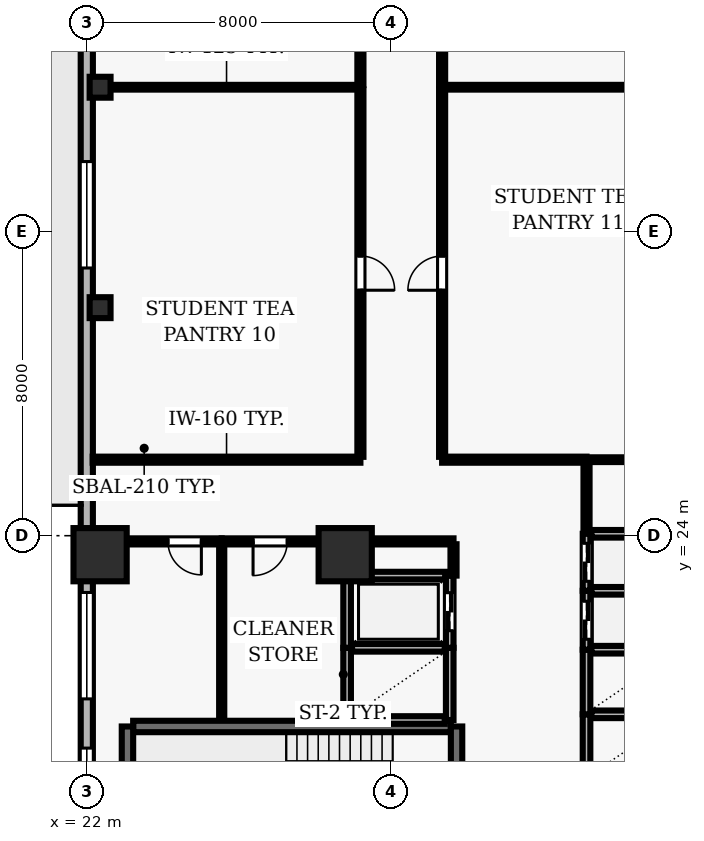
"""IFC4 building model, lengths in metres.
Left out: names, types, materials, properties, quantities, classifications, styles, units other than length and angle.
Written with IfcOpenShell. Run it as: python <this file> out.ifc"""

import sys

from ifc_helpers import new_model, si_unit, direction, frame, frame_2d, origin, origin_2d, place, context, subcontext, project, spatial, rectangle, hollow_rectangle, extrude, element, fill, save


model = new_model("IFC4")
c1 = context("Model", 3, precision=1e-05, world=origin(), true_north=direction((0.0, 1.0)))
c2 = subcontext(c1, "Body", "Model", "MODEL_VIEW")
j1 = project(units=[si_unit("LENGTHUNIT", "METRE"), si_unit("PLANEANGLEUNIT", "RADIAN")], contexts=[c1])
p1 = place(None, origin())
s1 = spatial("IfcSite", under=j1, at=p1, CompositionType="ELEMENT")
p2 = place(p1, origin())
s2 = spatial("IfcBuilding", under=s1, at=p2, CompositionType="ELEMENT")
p3 = place(p2, frame((0.0, 0.0, 85.6)))
s3 = spatial("IfcBuildingStorey", under=s2, at=p3, CompositionType="ELEMENT", Elevation=85.6)
for number, where, z_axis, x_axis in (
    (1, (22.35, 23.5, 0.0), (0.0, 0.0, 1.0), (1.0, 0.0, 0.0)),
    (2, (28.8, 23.5, 0.0), (0.0, 0.0, 1.0), (1.0, 0.0, 0.0)),
):
    element("IfcColumn", number, at=place(p3, frame(where, z_axis=z_axis, x_axis=x_axis)), inside=s3, PredefinedType="COLUMN", context=c2, shape_type="SweptSolid", body=[
        extrude(rectangle(XDim=1.4, YDim=1.4, at=origin_2d()), origin(), (0.0, 0.0, 1.0), 3.9),
    ])
for number, where, z_axis, x_axis in (
    (3, (22.35, 30.0, 0.0), (0.0, 0.0, 1.0), (1.0, 0.0, 0.0)),
    (4, (22.35, 35.8, 0.0), (0.0, 0.0, 1.0), (1.0, 0.0, 0.0)),
):
    element("IfcColumn", number, at=place(p3, frame(where, z_axis=z_axis, x_axis=x_axis)), inside=s3, PredefinedType="COLUMN", context=c2, shape_type="SweptSolid", body=[
        extrude(hollow_rectangle(XDim=0.55, YDim=0.55, WallThickness=0.025, at=origin_2d()), origin(), (0.0, 0.0, 1.0), 3.9),
    ])
p4 = place(p3, frame((22.0, 51.5, 0.0), z_axis=(0.0, 0.0, 1.0), x_axis=(0.0, -1.0, 0.0)))
e5 = element("IfcWall", 5, at=p4, inside=s3, PredefinedType="SOLIDWALL", context=c2, shape_type="SweptSolid", body=[
    extrude(rectangle(XDim=49.0, YDim=0.32, at=frame_2d((24.5, 0.0))), origin(), (0.0, 0.0, 1.0), 3.69),
])
p5 = place(p4, frame((12.1, 0.0, 0.0)))
e6 = element("IfcOpeningElement", 6, at=p5, cuts=e5, PredefinedType="OPENING", context=c2, shape_type="SweptSolid", body=[
    extrude(rectangle(XDim=1.0, YDim=2.2, at=frame_2d((0.5, 1.1))), frame((0.0, 0.17, 0.0), z_axis=(0.0, -1.0, 0.0), x_axis=(1.0, 0.0, 0.0)), (0.0, 0.0, 1.0), 0.34),
])
p6 = place(p4, frame((1.322, 0.0, 0.9)))
e7 = element("IfcOpeningElement", 7, at=p6, cuts=e5, PredefinedType="OPENING", context=c2, shape_type="SweptSolid", body=[
    extrude(rectangle(XDim=2.8, YDim=1.8, at=frame_2d((1.4, 0.9))), frame((0.0, 0.17, 0.0), z_axis=(0.0, -1.0, 0.0), x_axis=(1.0, 0.0, 0.0)), (0.0, 0.0, 1.0), 0.34),
])
p7 = place(p4, frame((17.656, 0.0, 0.9)))
e8 = element("IfcOpeningElement", 8, at=p7, cuts=e5, PredefinedType="OPENING", context=c2, shape_type="SweptSolid", body=[
    extrude(rectangle(XDim=2.8, YDim=1.8, at=frame_2d((1.4, 0.9))), frame((0.0, 0.17, 0.0), z_axis=(0.0, -1.0, 0.0), x_axis=(1.0, 0.0, 0.0)), (0.0, 0.0, 1.0), 0.34),
])
p8 = place(p4, frame((28.994, 0.0, 0.9)))
e9 = element("IfcOpeningElement", 9, at=p8, cuts=e5, PredefinedType="OPENING", context=c2, shape_type="SweptSolid", body=[
    extrude(rectangle(XDim=2.8, YDim=1.8, at=frame_2d((1.4, 0.9))), frame((0.0, 0.17, 0.0), z_axis=(0.0, -1.0, 0.0), x_axis=(1.0, 0.0, 0.0)), (0.0, 0.0, 1.0), 0.34),
])
p9 = place(p4, frame((33.089, 0.0, 0.9)))
e10 = element("IfcOpeningElement", 10, at=p9, cuts=e5, PredefinedType="OPENING", context=c2, shape_type="SweptSolid", body=[
    extrude(rectangle(XDim=2.8, YDim=1.8, at=frame_2d((1.4, 0.9))), frame((0.0, 0.17, 0.0), z_axis=(0.0, -1.0, 0.0), x_axis=(1.0, 0.0, 0.0)), (0.0, 0.0, 1.0), 0.34),
])
p10 = place(p4, frame((39.433, 0.0, 0.9)))
e11 = element("IfcOpeningElement", 11, at=p10, cuts=e5, PredefinedType="OPENING", context=c2, shape_type="SweptSolid", body=[
    extrude(rectangle(XDim=2.8, YDim=1.8, at=frame_2d((1.4, 0.9))), frame((0.0, 0.17, 0.0), z_axis=(0.0, -1.0, 0.0), x_axis=(1.0, 0.0, 0.0)), (0.0, 0.0, 1.0), 0.34),
])
p11 = place(p3, frame((31.58, 18.98, 0.0), z_axis=(0.0, 0.0, 1.0), x_axis=(-1.0, 0.0, 0.0)))
e12 = element("IfcWall", 12, at=p11, inside=s3, PredefinedType="SHEAR", context=c2, shape_type="SweptSolid", body=[
    extrude(rectangle(XDim=8.36, YDim=0.3, at=frame_2d((4.18, 0.0))), origin(), (0.0, 0.0, 1.0), 3.69),
])
p12 = place(p3, frame((23.07, 18.98, 0.0), z_axis=(0.0, 0.0, 1.0), x_axis=(0.0, -1.0, 0.0)))
e13 = element("IfcWall", 13, at=p12, inside=s3, PredefinedType="SHEAR", context=c2, shape_type="SweptSolid", body=[
    extrude(rectangle(XDim=3.51, YDim=0.3, at=frame_2d((1.755, 0.0))), origin(), (0.0, 0.0, 1.0), 3.69),
])
p13 = place(p3, frame((31.73, 15.47, 0.0), z_axis=(0.0, 0.0, 1.0), x_axis=(0.0, 1.0, 0.0)))
e14 = element("IfcWall", 14, at=p13, inside=s3, PredefinedType="SHEAR", context=c2, shape_type="SweptSolid", body=[
    extrude(rectangle(XDim=3.51, YDim=0.3, at=frame_2d((1.755, 0.0))), origin(), (0.0, 0.0, 1.0), 3.69),
])
p14 = place(p13, frame((1.18, 0.0, 0.0)))
e15 = element("IfcOpeningElement", 15, at=p14, cuts=e14, PredefinedType="OPENING", context=c2, shape_type="SweptSolid", body=[
    extrude(rectangle(XDim=1.15, YDim=2.15, at=frame_2d((0.575, 1.075))), frame((0.0, 0.16, 0.0), z_axis=(0.0, -1.0, 0.0), x_axis=(1.0, 0.0, 0.0)), (0.0, 0.0, 1.0), 0.32),
])
p15 = place(p3, frame((35.15, 19.3, 0.0), z_axis=(0.0, 0.0, 1.0), x_axis=(0.0, -1.0, 0.0)))
e16 = element("IfcWall", 16, at=p15, inside=s3, PredefinedType="SOLIDWALL", context=c2, shape_type="SweptSolid", body=[
    extrude(rectangle(XDim=1.7, YDim=0.2, at=frame_2d((0.85, 0.0))), origin(), (0.0, 0.0, 1.0), 3.69),
])
p16 = place(p3, frame((37.42, 19.3, 0.0), z_axis=(0.0, 0.0, 1.0), x_axis=(-1.0, 0.0, 0.0)))
e17 = element("IfcWall", 17, at=p16, inside=s3, PredefinedType="SOLIDWALL", context=c2, shape_type="SweptSolid", body=[
    extrude(rectangle(XDim=2.14, YDim=0.2, at=frame_2d((1.07, 0.0))), origin(), (0.0, 0.0, 1.0), 3.69),
])
p17 = place(p3, frame((35.15, 21.0, 0.0), z_axis=(0.0, 0.0, 1.0), x_axis=(0.0, -1.0, 0.0)))
e18 = element("IfcWall", 18, at=p17, inside=s3, PredefinedType="SOLIDWALL", context=c2, shape_type="SweptSolid", body=[
    extrude(rectangle(XDim=1.7, YDim=0.2, at=frame_2d((0.85, 0.0))), origin(), (0.0, 0.0, 1.0), 3.69),
])
p18 = place(p3, frame((37.42, 21.0, 0.0), z_axis=(0.0, 0.0, 1.0), x_axis=(-1.0, 0.0, 0.0)))
e19 = element("IfcWall", 19, at=p18, inside=s3, PredefinedType="SOLIDWALL", context=c2, shape_type="SweptSolid", body=[
    extrude(rectangle(XDim=2.14, YDim=0.2, at=frame_2d((1.07, 0.0))), origin(), (0.0, 0.0, 1.0), 3.69),
])
for number, where, z_axis, x_axis in (
    (20, (28.85, 21.05, 0.0), (0.0, 0.0, 1.0), (0.0, -1.0, 0.0)),
    (21, (31.55, 19.15, 0.0), (0.0, 0.0, 1.0), (0.0, 1.0, 0.0)),
):
    element("IfcWall", number, at=place(p3, frame(where, z_axis=z_axis, x_axis=x_axis)), inside=s3, PredefinedType="SOLIDWALL", context=c2, shape_type="SweptSolid", body=[
        extrude(rectangle(XDim=1.9, YDim=0.2, at=frame_2d((0.95, 0.0))), origin(), (0.0, 0.0, 1.0), 3.69),
    ])
for number, where, z_axis, x_axis in (
    (22, (28.98, 19.15, 0.0), (0.0, 0.0, 1.0), (1.0, 0.0, 0.0)),
    (23, (31.42, 21.05, 0.0), (0.0, 0.0, 1.0), (-1.0, 0.0, 0.0)),
):
    element("IfcWall", number, at=place(p3, frame(where, z_axis=z_axis, x_axis=x_axis)), inside=s3, PredefinedType="SOLIDWALL", context=c2, shape_type="SweptSolid", body=[
        extrude(rectangle(XDim=2.44, YDim=0.2, at=frame_2d((1.22, 0.0))), origin(), (0.0, 0.0, 1.0), 3.69),
    ])
p19 = place(p3, frame((35.15, 22.55, 0.0), z_axis=(0.0, 0.0, 1.0), x_axis=(0.0, -1.0, 0.0)))
e24 = element("IfcWall", 24, at=p19, inside=s3, PredefinedType="SOLIDWALL", context=c2, shape_type="SweptSolid", body=[
    extrude(rectangle(XDim=1.55, YDim=0.2, at=frame_2d((0.775, 0.0))), origin(), (0.0, 0.0, 1.0), 3.69),
])
p20 = place(p19, frame((0.275, 0.0, 0.0)))
e25 = element("IfcOpeningElement", 25, at=p20, cuts=e24, PredefinedType="OPENING", context=c2, shape_type="SweptSolid", body=[
    extrude(rectangle(XDim=1.0, YDim=2.1, at=frame_2d((0.5, 1.05))), frame((0.0, 0.11, 0.0), z_axis=(0.0, -1.0, 0.0), x_axis=(1.0, 0.0, 0.0)), (0.0, 0.0, 1.0), 0.22),
])
p21 = place(p3, frame((37.42, 22.55, 0.0), z_axis=(0.0, 0.0, 1.0), x_axis=(-1.0, 0.0, 0.0)))
e26 = element("IfcWall", 26, at=p21, inside=s3, PredefinedType="SOLIDWALL", context=c2, shape_type="SweptSolid", body=[
    extrude(rectangle(XDim=2.14, YDim=0.2, at=frame_2d((1.07, 0.0))), origin(), (0.0, 0.0, 1.0), 3.69),
])
p22 = place(p3, frame((35.15, 24.05, 0.0), z_axis=(0.0, 0.0, 1.0), x_axis=(0.0, -1.0, 0.0)))
e27 = element("IfcWall", 27, at=p22, inside=s3, PredefinedType="SOLIDWALL", context=c2, shape_type="SweptSolid", body=[
    extrude(rectangle(XDim=1.5, YDim=0.2, at=frame_2d((0.75, 0.0))), origin(), (0.0, 0.0, 1.0), 3.69),
])
p23 = place(p22, frame((0.25, 0.0, 0.0)))
e28 = element("IfcOpeningElement", 28, at=p23, cuts=e27, PredefinedType="OPENING", context=c2, shape_type="SweptSolid", body=[
    extrude(rectangle(XDim=1.0, YDim=2.1, at=frame_2d((0.5, 1.05))), frame((0.0, 0.11, 0.0), z_axis=(0.0, -1.0, 0.0), x_axis=(1.0, 0.0, 0.0)), (0.0, 0.0, 1.0), 0.22),
])
p24 = place(p3, frame((37.42, 24.05, 0.0), z_axis=(0.0, 0.0, 1.0), x_axis=(-1.0, 0.0, 0.0)))
e29 = element("IfcWall", 29, at=p24, inside=s3, PredefinedType="SOLIDWALL", context=c2, shape_type="SweptSolid", body=[
    extrude(rectangle(XDim=2.14, YDim=0.2, at=frame_2d((1.07, 0.0))), origin(), (0.0, 0.0, 1.0), 3.69),
])
p25 = place(p3, frame((28.85, 22.95, 0.0), z_axis=(0.0, 0.0, 1.0), x_axis=(0.0, -1.0, 0.0)))
e30 = element("IfcWall", 30, at=p25, inside=s3, PredefinedType="SOLIDWALL", context=c2, shape_type="SweptSolid", body=[
    extrude(rectangle(XDim=1.9, YDim=0.2, at=frame_2d((0.95, 0.0))), origin(), (0.0, 0.0, 1.0), 3.69),
])
p26 = place(p3, frame((31.55, 21.05, 0.0), z_axis=(0.0, 0.0, 1.0), x_axis=(0.0, 1.0, 0.0)))
e31 = element("IfcWall", 31, at=p26, inside=s3, PredefinedType="SOLIDWALL", context=c2, shape_type="SweptSolid", body=[
    extrude(rectangle(XDim=1.9, YDim=0.2, at=frame_2d((0.95, 0.0))), origin(), (0.0, 0.0, 1.0), 3.69),
])
p27 = place(p26, frame((0.45, 0.0, 0.0)))
e32 = element("IfcOpeningElement", 32, at=p27, cuts=e31, PredefinedType="OPENING", context=c2, shape_type="SweptSolid", body=[
    extrude(rectangle(XDim=1.0, YDim=2.1, at=frame_2d((0.5, 1.05))), frame((0.0, 0.11, 0.0), z_axis=(0.0, -1.0, 0.0), x_axis=(1.0, 0.0, 0.0)), (0.0, 0.0, 1.0), 0.22),
])
p28 = place(p3, frame((31.43, 22.95, 0.0), z_axis=(0.0, 0.0, 1.0), x_axis=(-1.0, 0.0, 0.0)))
e33 = element("IfcWall", 33, at=p28, inside=s3, PredefinedType="SOLIDWALL", context=c2, shape_type="SweptSolid", body=[
    extrude(rectangle(XDim=2.46, YDim=0.2, at=frame_2d((1.23, 0.0))), origin(), (0.0, 0.0, 1.0), 3.69),
])
p29 = place(p3, frame((25.55, 23.85, 0.0), z_axis=(0.0, 0.0, 1.0), x_axis=(-1.0, 0.0, 0.0)))
e34 = element("IfcWall", 34, at=p29, inside=s3, PredefinedType="PARTITIONING", context=c2, shape_type="SweptSolid", body=[
    extrude(rectangle(XDim=3.35, YDim=0.16, at=frame_2d((1.675, 0.0))), origin(), (0.0, 0.0, 1.0), 2.995),
])
p30 = place(p29, frame((0.535, 0.0, 0.0)))
e35 = element("IfcOpeningElement", 35, at=p30, cuts=e34, PredefinedType="OPENING", context=c2, shape_type="SweptSolid", body=[
    extrude(rectangle(XDim=0.88, YDim=2.1, at=frame_2d((0.44, 1.05))), frame((0.0, 0.09, 0.0), z_axis=(0.0, -1.0, 0.0), x_axis=(1.0, 0.0, 0.0)), (0.0, 0.0, 1.0), 0.18),
])
p31 = place(p3, frame((28.8, 23.85, 0.0), z_axis=(0.0, 0.0, 1.0), x_axis=(-1.0, 0.0, 0.0)))
e36 = element("IfcWall", 36, at=p31, inside=s3, PredefinedType="PARTITIONING", context=c2, shape_type="SweptSolid", body=[
    extrude(rectangle(XDim=3.25, YDim=0.16, at=frame_2d((1.625, 0.0))), origin(), (0.0, 0.0, 1.0), 2.995),
])
p32 = place(p31, frame((1.525, 0.0, 0.0)))
e37 = element("IfcOpeningElement", 37, at=p32, cuts=e36, PredefinedType="OPENING", context=c2, shape_type="SweptSolid", body=[
    extrude(rectangle(XDim=0.9, YDim=2.1, at=frame_2d((0.45, 1.05))), frame((0.0, 0.09, 0.0), z_axis=(0.0, -1.0, 0.0), x_axis=(1.0, 0.0, 0.0)), (0.0, 0.0, 1.0), 0.18),
])
p33 = place(p3, frame((28.8, 23.85, 0.0), z_axis=(0.0, 0.0, 1.0), x_axis=(1.0, 0.0, 0.0)))
e38 = element("IfcWall", 38, at=p33, inside=s3, PredefinedType="PARTITIONING", context=c2, shape_type="SweptSolid", body=[
    extrude(rectangle(XDim=2.85, YDim=0.16, at=frame_2d((1.425, 0.0))), origin(), (0.0, 0.0, 1.0), 3.69),
])
p34 = place(p3, frame((29.2, 26.0, 0.0), z_axis=(0.0, 0.0, 1.0), x_axis=(-1.0, 0.0, 0.0)))
e39 = element("IfcWall", 39, at=p34, inside=s3, PredefinedType="PARTITIONING", context=c2, shape_type="SweptSolid", body=[
    extrude(rectangle(XDim=7.045, YDim=0.16, at=frame_2d((3.522, 0.0))), origin(), (0.0, 0.0, 1.0), 3.69),
])
p35 = place(p3, frame((29.2, 35.8, 0.0), z_axis=(0.0, 0.0, 1.0), x_axis=(-1.0, 0.0, 0.0)))
e40 = element("IfcWall", 40, at=p35, inside=s3, PredefinedType="PARTITIONING", context=c2, shape_type="SweptSolid", body=[
    extrude(rectangle(XDim=7.045, YDim=0.125, at=frame_2d((3.522, 0.0))), origin(), (0.0, 0.0, 1.0), 2.995),
])
p36 = place(p3, frame((35.15, 26.0, 0.0), z_axis=(0.0, 0.0, 1.0), x_axis=(-1.0, 0.0, 0.0)))
e41 = element("IfcWall", 41, at=p36, inside=s3, PredefinedType="PARTITIONING", context=c2, shape_type="SweptSolid", body=[
    extrude(rectangle(XDim=3.8, YDim=0.16, at=frame_2d((1.9, 0.0))), origin(), (0.0, 0.0, 1.0), 3.69),
])
p37 = place(p3, frame((35.15, 26.0, 0.0), z_axis=(0.0, 0.0, 1.0), x_axis=(1.0, 0.0, 0.0)))
e42 = element("IfcWall", 42, at=p37, inside=s3, PredefinedType="PARTITIONING", context=c2, shape_type="SweptSolid", body=[
    extrude(rectangle(XDim=2.695, YDim=0.125, at=frame_2d((1.348, 0.0))), origin(), (0.0, 0.0, 1.0), 3.69),
])
p38 = place(p3, frame((37.845, 35.8, 0.0), z_axis=(0.0, 0.0, 1.0), x_axis=(-1.0, 0.0, 0.0)))
e43 = element("IfcWall", 43, at=p38, inside=s3, PredefinedType="PARTITIONING", context=c2, shape_type="SweptSolid", body=[
    extrude(rectangle(XDim=6.495, YDim=0.125, at=frame_2d((3.248, 0.0))), origin(), (0.0, 0.0, 1.0), 2.995),
])
p39 = place(p3, frame((25.55, 19.16, 0.0), z_axis=(0.0, 0.0, 1.0), x_axis=(0.0, 1.0, 0.0)))
e44 = element("IfcWall", 44, at=p39, inside=s3, PredefinedType="PARTITIONING", context=c2, shape_type="SweptSolid", body=[
    extrude(rectangle(XDim=4.615, YDim=0.135, at=frame_2d((2.308, 0.0))), origin(), (0.0, 0.0, 1.0), 3.69),
])
p40 = place(p3, frame((28.8, 22.95, 0.0), z_axis=(0.0, 0.0, 1.0), x_axis=(0.0, 1.0, 0.0)))
e45 = element("IfcWall", 45, at=p40, inside=s3, PredefinedType="PARTITIONING", context=c2, shape_type="SweptSolid", body=[
    extrude(rectangle(XDim=0.825, YDim=0.125, at=frame_2d((0.413, 0.0))), origin(), (0.0, 0.0, 1.0), 3.69),
])
p41 = place(p3, frame((29.2, 35.742, 0.0), z_axis=(0.0, 0.0, 1.0), x_axis=(0.0, -1.0, 0.0)))
e46 = element("IfcWall", 46, at=p41, inside=s3, PredefinedType="PARTITIONING", context=c2, shape_type="SweptSolid", body=[
    extrude(rectangle(XDim=9.667, YDim=0.16, at=frame_2d((4.833, 0.0))), origin(), (0.0, 0.0, 1.0), 3.69),
])
p42 = place(p41, frame((4.383, 0.0, 0.0)))
e47 = element("IfcOpeningElement", 47, at=p42, cuts=e46, PredefinedType="OPENING", context=c2, shape_type="SweptSolid", body=[
    extrude(rectangle(XDim=0.9, YDim=2.1, at=frame_2d((0.45, 1.05))), frame((0.0, 0.09, 0.0), z_axis=(0.0, -1.0, 0.0), x_axis=(1.0, 0.0, 0.0)), (0.0, 0.0, 1.0), 0.18),
])
p43 = place(p3, frame((29.2, 44.692, 0.0), z_axis=(0.0, 0.0, 1.0), x_axis=(0.0, -1.0, 0.0)))
e48 = element("IfcWall", 48, at=p43, inside=s3, PredefinedType="PARTITIONING", context=c2, shape_type="SweptSolid", body=[
    extrude(rectangle(XDim=8.835, YDim=0.16, at=frame_2d((4.417, 0.0))), origin(), (0.0, 0.0, 1.0), 3.69),
])
p44 = place(p43, frame((3.968, 0.0, 0.0)))
e49 = element("IfcOpeningElement", 49, at=p44, cuts=e48, PredefinedType="OPENING", context=c2, shape_type="SweptSolid", body=[
    extrude(rectangle(XDim=0.9, YDim=2.1, at=frame_2d((0.45, 1.05))), frame((0.0, 0.09, 0.0), z_axis=(0.0, -1.0, 0.0), x_axis=(1.0, 0.0, 0.0)), (0.0, 0.0, 1.0), 0.18),
])
p45 = place(p3, frame((31.35, 26.075, 0.0), z_axis=(0.0, 0.0, 1.0), x_axis=(0.0, 1.0, 0.0)))
e50 = element("IfcWall", 50, at=p45, inside=s3, PredefinedType="PARTITIONING", context=c2, shape_type="SweptSolid", body=[
    extrude(rectangle(XDim=9.667, YDim=0.16, at=frame_2d((4.833, 0.0))), origin(), (0.0, 0.0, 1.0), 3.69),
])
p46 = place(p45, frame((4.383, 0.0, 0.0)))
e51 = element("IfcOpeningElement", 51, at=p46, cuts=e50, PredefinedType="OPENING", context=c2, shape_type="SweptSolid", body=[
    extrude(rectangle(XDim=0.9, YDim=2.1, at=frame_2d((0.45, 1.05))), frame((0.0, 0.09, 0.0), z_axis=(0.0, -1.0, 0.0), x_axis=(1.0, 0.0, 0.0)), (0.0, 0.0, 1.0), 0.18),
])
p47 = place(p3, frame((31.35, 35.857, 0.0), z_axis=(0.0, 0.0, 1.0), x_axis=(0.0, 1.0, 0.0)))
e52 = element("IfcWall", 52, at=p47, inside=s3, PredefinedType="PARTITIONING", context=c2, shape_type="SweptSolid", body=[
    extrude(rectangle(XDim=8.818, YDim=0.16, at=frame_2d((4.409, 0.0))), origin(), (0.0, 0.0, 1.0), 3.69),
])
p48 = place(p47, frame((3.959, 0.0, 0.0)))
e53 = element("IfcOpeningElement", 53, at=p48, cuts=e52, PredefinedType="OPENING", context=c2, shape_type="SweptSolid", body=[
    extrude(rectangle(XDim=0.9, YDim=2.1, at=frame_2d((0.45, 1.05))), frame((0.0, 0.09, 0.0), z_axis=(0.0, -1.0, 0.0), x_axis=(1.0, 0.0, 0.0)), (0.0, 0.0, 1.0), 0.18),
])
p49 = place(p3, frame((31.65, 23.775, 0.0), z_axis=(0.0, 0.0, 1.0), x_axis=(0.0, -1.0, 0.0)))
e54 = element("IfcWall", 54, at=p49, inside=s3, PredefinedType="PARTITIONING", context=c2, shape_type="SweptSolid", body=[
    extrude(rectangle(XDim=0.825, YDim=0.16, at=frame_2d((0.413, 0.0))), origin(), (0.0, 0.0, 1.0), 3.69),
])
p50 = place(p3, frame((35.15, 24.07, 0.0), z_axis=(0.0, 0.0, 1.0), x_axis=(0.0, 1.0, 0.0)))
e55 = element("IfcWall", 55, at=p50, inside=s3, PredefinedType="PARTITIONING", context=c2, shape_type="SweptSolid", body=[
    extrude(rectangle(XDim=1.855, YDim=0.16, at=frame_2d((0.927, 0.0))), origin(), (0.0, 0.0, 1.0), 3.69),
])
p51 = place(p7, origin())
e56 = element("IfcWindow", 56, at=p51, inside=s3, PartitioningType="SINGLE_PANEL", PredefinedType="WINDOW", context=c2, shape_type="SweptSolid", body=[
    extrude(rectangle(XDim=2.8, YDim=1.8, at=frame_2d((1.4, 0.9))), frame((0.0, 0.03, 0.0), z_axis=(0.0, -1.0, 0.0), x_axis=(1.0, 0.0, 0.0)), (0.0, 0.0, 1.0), 0.06),
])
fill(e8, e56)
p52 = place(p8, origin())
e57 = element("IfcWindow", 57, at=p52, inside=s3, PartitioningType="SINGLE_PANEL", PredefinedType="WINDOW", context=c2, shape_type="SweptSolid", body=[
    extrude(rectangle(XDim=2.8, YDim=1.8, at=frame_2d((1.4, 0.9))), frame((0.0, 0.03, 0.0), z_axis=(0.0, -1.0, 0.0), x_axis=(1.0, 0.0, 0.0)), (0.0, 0.0, 1.0), 0.06),
])
fill(e9, e57)
p53 = place(p9, origin())
e58 = element("IfcWindow", 58, at=p53, inside=s3, PartitioningType="SINGLE_PANEL", PredefinedType="WINDOW", context=c2, shape_type="SweptSolid", body=[
    extrude(rectangle(XDim=2.8, YDim=1.8, at=frame_2d((1.4, 0.9))), frame((0.0, 0.03, 0.0), z_axis=(0.0, -1.0, 0.0), x_axis=(1.0, 0.0, 0.0)), (0.0, 0.0, 1.0), 0.06),
])
fill(e10, e58)
p54 = place(p20, origin())
e59 = element("IfcDoor", 59, at=p54, inside=s3, OperationType="DOUBLE_DOOR_SLIDING", PredefinedType="DOOR", context=c2, shape_type="SweptSolid", body=[
    extrude(rectangle(XDim=1.0, YDim=2.1, at=frame_2d((0.5, 1.05))), frame((0.0, 0.025, 0.0), z_axis=(0.0, -1.0, 0.0), x_axis=(1.0, 0.0, 0.0)), (0.0, 0.0, 1.0), 0.05),
])
fill(e25, e59)
p55 = place(p23, origin())
e60 = element("IfcDoor", 60, at=p55, inside=s3, OperationType="DOUBLE_DOOR_SLIDING", PredefinedType="DOOR", context=c2, shape_type="SweptSolid", body=[
    extrude(rectangle(XDim=1.0, YDim=2.1, at=frame_2d((0.5, 1.05))), frame((0.0, 0.025, 0.0), z_axis=(0.0, -1.0, 0.0), x_axis=(1.0, 0.0, 0.0)), (0.0, 0.0, 1.0), 0.05),
])
fill(e28, e60)
p56 = place(p27, origin())
e61 = element("IfcDoor", 61, at=p56, inside=s3, OperationType="DOUBLE_DOOR_SLIDING", PredefinedType="DOOR", context=c2, shape_type="SweptSolid", body=[
    extrude(rectangle(XDim=1.0, YDim=2.1, at=frame_2d((0.5, 1.05))), frame((0.0, 0.025, 0.0), z_axis=(0.0, -1.0, 0.0), x_axis=(1.0, 0.0, 0.0)), (0.0, 0.0, 1.0), 0.05),
])
fill(e32, e61)
p57 = place(p30, origin())
e62 = element("IfcDoor", 62, at=p57, inside=s3, OperationType="SINGLE_SWING_LEFT", PredefinedType="DOOR", context=c2, shape_type="SweptSolid", body=[
    extrude(rectangle(XDim=0.88, YDim=2.1, at=frame_2d((0.44, 1.05))), frame((0.0, 0.025, 0.0), z_axis=(0.0, -1.0, 0.0), x_axis=(1.0, 0.0, 0.0)), (0.0, 0.0, 1.0), 0.05),
])
fill(e35, e62)
p58 = place(p32, origin())
e63 = element("IfcDoor", 63, at=p58, inside=s3, OperationType="SINGLE_SWING_RIGHT", PredefinedType="DOOR", context=c2, shape_type="SweptSolid", body=[
    extrude(rectangle(XDim=0.9, YDim=2.1, at=frame_2d((0.45, 1.05))), frame((0.0, 0.025, 0.0), z_axis=(0.0, -1.0, 0.0), x_axis=(1.0, 0.0, 0.0)), (0.0, 0.0, 1.0), 0.05),
])
fill(e37, e63)
p59 = place(p42, origin())
e64 = element("IfcDoor", 64, at=p59, inside=s3, OperationType="SINGLE_SWING_RIGHT", PredefinedType="DOOR", context=c2, shape_type="SweptSolid", body=[
    extrude(rectangle(XDim=0.9, YDim=2.1, at=frame_2d((0.45, 1.05))), frame((0.0, 0.025, 0.0), z_axis=(0.0, -1.0, 0.0), x_axis=(1.0, 0.0, 0.0)), (0.0, 0.0, 1.0), 0.05),
])
fill(e47, e64)
p60 = place(p46, origin())
e65 = element("IfcDoor", 65, at=p60, inside=s3, OperationType="SINGLE_SWING_LEFT", PredefinedType="DOOR", context=c2, shape_type="SweptSolid", body=[
    extrude(rectangle(XDim=0.9, YDim=2.1, at=frame_2d((0.45, 1.05))), frame((0.0, 0.025, 0.0), z_axis=(0.0, -1.0, 0.0), x_axis=(1.0, 0.0, 0.0)), (0.0, 0.0, 1.0), 0.05),
])
fill(e51, e65)
save(model, sys.argv[1])
